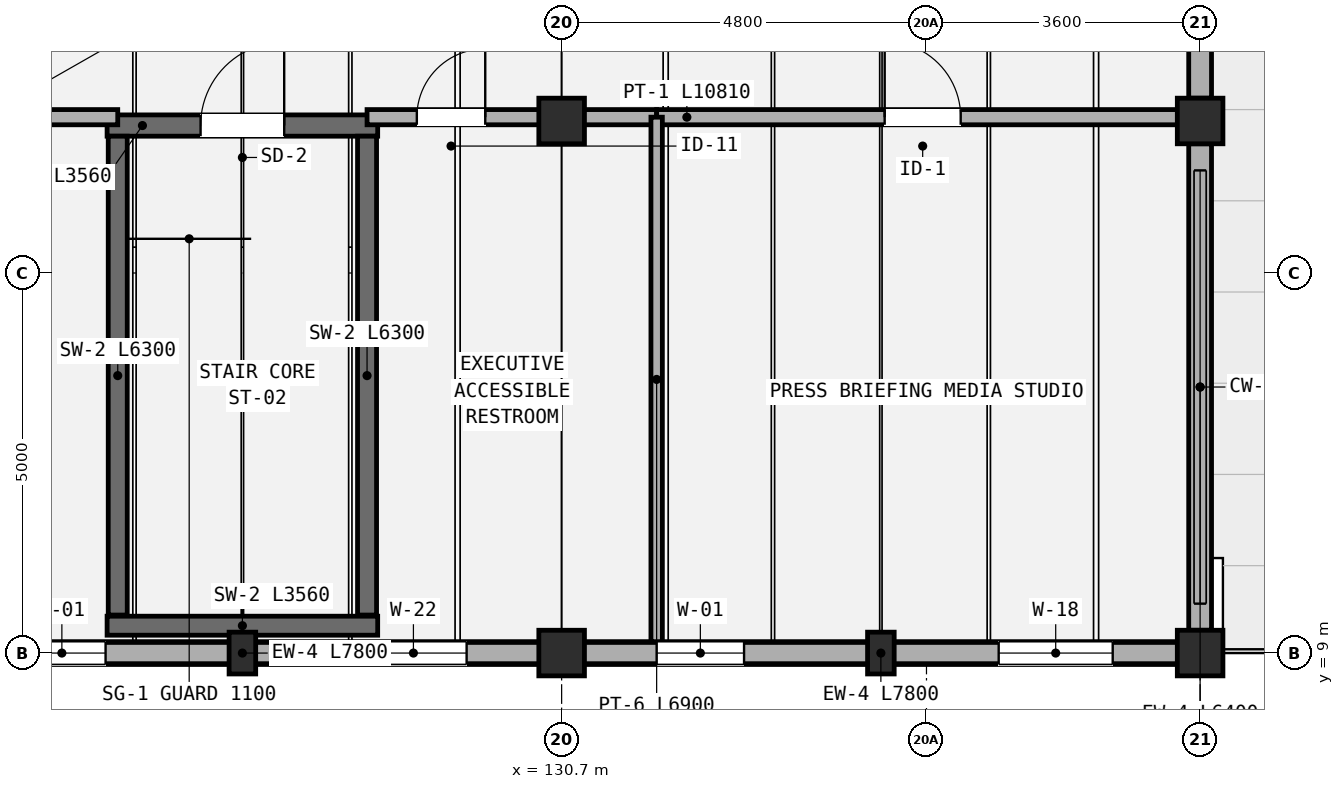
"""IFC4 building model, lengths in metres.
Left out: names, types, materials, properties, quantities, classifications, styles, units other than length and angle.
Written with IfcOpenShell. Run it as: python <this file> out.ifc"""

import sys

from ifc_helpers import new_model, si_unit, direction, frame, frame_2d, origin, origin_2d, place, context, subcontext, project, spatial, polyline, rectangle, outline, extrude, element, fill, save


model = new_model("IFC4")
c1 = context("Model", 3, precision=1e-05, world=origin(), true_north=direction((0.0, 1.0)))
c2 = subcontext(c1, "Body", "Model", "MODEL_VIEW")
j1 = project(units=[si_unit("LENGTHUNIT", "METRE"), si_unit("PLANEANGLEUNIT", "RADIAN")], contexts=[c1])
p1 = place(None, origin())
s1 = spatial("IfcSite", under=j1, at=p1, CompositionType="ELEMENT")
p2 = place(p1, origin())
s2 = spatial("IfcBuilding", under=s1, at=p2, CompositionType="ELEMENT")
p3 = place(p2, frame((0.0, 0.0, 12.75)))
s3 = spatial("IfcBuildingStorey", under=s2, at=p3, CompositionType="ELEMENT", Elevation=12.75)
for number, where, z_axis, x_axis in (
    (1, (130.7, 9.0, 0.0), (0.0, 0.0, 1.0), (1.0, 0.0, 0.0)),
    (2, (130.7, 16.0, 0.0), (0.0, 0.0, 1.0), (1.0, 0.0, 0.0)),
    (3, (139.1, 9.0, 0.0), (0.0, 0.0, 1.0), (1.0, 0.0, 0.0)),
    (4, (139.1, 16.0, 0.0), (0.0, 0.0, 1.0), (1.0, 0.0, 0.0)),
):
    element("IfcColumn", number, at=place(p3, frame(where, z_axis=z_axis, x_axis=x_axis)), inside=s3, PredefinedType="COLUMN", context=c2, shape_type="SweptSolid", body=[
        extrude(rectangle(XDim=0.6, YDim=0.6, at=origin_2d()), origin(), (0.0, 0.0, 1.0), 3.0),
    ])
for number, where, z_axis, x_axis in (
    (5, (126.5, 9.0, 0.0), (0.0, 0.0, 1.0), (1.0, 0.0, 0.0)),
    (6, (134.9, 9.0, 0.0), (0.0, 0.0, 1.0), (1.0, 0.0, 0.0)),
):
    element("IfcColumn", number, at=place(p3, frame(where, z_axis=z_axis, x_axis=x_axis)), inside=s3, PredefinedType="PILASTER", context=c2, shape_type="SweptSolid", body=[
        extrude(rectangle(XDim=0.35, YDim=0.55, at=origin_2d()), origin(), (0.0, 0.0, 1.0), 3.0),
    ])
p4 = place(p3, frame((122.6, 9.0, 0.0), z_axis=(0.0, 0.0, 1.0), x_axis=(1.0, 0.0, 0.0)))
e7 = element("IfcWall", 7, at=p4, inside=s3, PredefinedType="STANDARD", context=c2, shape_type="SweptSolid", body=[
    extrude(rectangle(XDim=7.8, YDim=0.3, at=frame_2d((3.9, 0.0))), origin(), (0.0, 0.0, 1.0), 2.29),
])
p5 = place(p4, frame((0.95, 0.0, 0.6)))
e8 = element("IfcOpeningElement", 8, at=p5, cuts=e7, PredefinedType="OPENING", context=c2, shape_type="SweptSolid", body=[
    extrude(rectangle(XDim=1.15, YDim=1.45, at=frame_2d((0.575, 0.725))), frame((0.0, 0.16, 0.0), z_axis=(0.0, -1.0, 0.0), x_axis=(1.0, 0.0, 0.0)), (0.0, 0.0, 1.0), 0.32),
])
p6 = place(p4, frame((5.45, 0.0, 0.6)))
e9 = element("IfcOpeningElement", 9, at=p6, cuts=e7, PredefinedType="OPENING", context=c2, shape_type="SweptSolid", body=[
    extrude(rectangle(XDim=1.4, YDim=1.45, at=frame_2d((0.7, 0.725))), frame((0.0, 0.16, 0.0), z_axis=(0.0, -1.0, 0.0), x_axis=(1.0, 0.0, 0.0)), (0.0, 0.0, 1.0), 0.32),
])
p7 = place(p3, frame((131.0, 9.0, 0.0), z_axis=(0.0, 0.0, 1.0), x_axis=(1.0, 0.0, 0.0)))
e10 = element("IfcWall", 10, at=p7, inside=s3, PredefinedType="STANDARD", context=c2, shape_type="SweptSolid", body=[
    extrude(rectangle(XDim=7.8, YDim=0.3, at=frame_2d((3.9, 0.0))), origin(), (0.0, 0.0, 1.0), 2.29),
])
p8 = place(p7, frame((0.95, 0.0, 0.6)))
e11 = element("IfcOpeningElement", 11, at=p8, cuts=e10, PredefinedType="OPENING", context=c2, shape_type="SweptSolid", body=[
    extrude(rectangle(XDim=1.15, YDim=1.45, at=frame_2d((0.575, 0.725))), frame((0.0, 0.16, 0.0), z_axis=(0.0, -1.0, 0.0), x_axis=(1.0, 0.0, 0.0)), (0.0, 0.0, 1.0), 0.32),
])
p9 = place(p7, frame((5.45, 0.0, 0.65)))
e12 = element("IfcOpeningElement", 12, at=p9, cuts=e10, PredefinedType="OPENING", context=c2, shape_type="SweptSolid", body=[
    extrude(rectangle(XDim=1.5, YDim=1.4, at=frame_2d((0.75, 0.7))), frame((0.0, 0.16, 0.0), z_axis=(0.0, -1.0, 0.0), x_axis=(1.0, 0.0, 0.0)), (0.0, 0.0, 1.0), 0.32),
])
p10 = place(p3, frame((122.3, 9.0, 3.0), z_axis=(0.0, 0.0, 1.0), x_axis=(1.0, 0.0, 0.0)))
e13 = element("IfcWall", 13, at=p10, inside=s3, PredefinedType="PARAPET", context=c2, shape_type="SweptSolid", body=[
    extrude(outline(polyline([(0.0, 0.0), (8.4, 0.0), (8.4, 0.8), (7.468, 0.8), (7.467, 0.913), (6.534, 0.913), (6.533, 1.025), (5.601, 1.025), (5.6, 1.137), (4.668, 1.137), (4.667, 1.25), (3.734, 1.25), (3.733, 1.137), (2.801, 1.137), (2.8, 1.025), (1.868, 1.025), (1.867, 0.913), (0.934, 0.913), (0.933, 0.8), (0.0, 0.8), (0.0, 0.0)])), frame((0.0, 0.14, 0.0), z_axis=(0.0, -1.0, 0.0), x_axis=(1.0, 0.0, 0.0)), (0.0, 0.0, 1.0), 0.28),
])
p11 = place(p3, frame((130.7, 9.0, 3.0), z_axis=(0.0, 0.0, 1.0), x_axis=(1.0, 0.0, 0.0)))
e14 = element("IfcWall", 14, at=p11, inside=s3, PredefinedType="PARAPET", context=c2, shape_type="SweptSolid", body=[
    extrude(outline(polyline([(0.0, 0.0), (8.4, 0.0), (8.4, 0.8), (7.468, 0.8), (7.467, 0.913), (6.534, 0.913), (6.533, 1.025), (5.601, 1.025), (5.6, 1.137), (4.668, 1.137), (4.667, 1.25), (3.734, 1.25), (3.733, 1.137), (2.801, 1.137), (2.8, 1.025), (1.868, 1.025), (1.867, 0.913), (0.934, 0.913), (0.933, 0.8), (0.0, 0.8), (0.0, 0.0)])), frame((0.0, 0.14, 0.0), z_axis=(0.0, -1.0, 0.0), x_axis=(1.0, 0.0, 0.0)), (0.0, 0.0, 1.0), 0.28),
])
p12 = place(p3, frame((139.1, 9.3, 0.0), z_axis=(0.0, 0.0, 1.0), x_axis=(0.0, 1.0, 0.0)))
e15 = element("IfcWall", 15, at=p12, inside=s3, PredefinedType="STANDARD", context=c2, shape_type="SweptSolid", body=[
    extrude(rectangle(XDim=6.4, YDim=0.3, at=frame_2d((3.2, 0.0))), origin(), (0.0, 0.0, 1.0), 2.35),
])
p13 = place(p3, frame((139.1, 16.3, 0.0), z_axis=(0.0, 0.0, 1.0), x_axis=(0.0, 1.0, 0.0)))
e16 = element("IfcWall", 16, at=p13, inside=s3, PredefinedType="STANDARD", context=c2, shape_type="SweptSolid", body=[
    extrude(rectangle(XDim=7.9, YDim=0.3, at=frame_2d((3.95, 0.0))), origin(), (0.0, 0.0, 1.0), 2.35),
])
p14 = place(p13, frame((0.8, 0.0, 0.0)))
e17 = element("IfcOpeningElement", 17, at=p14, cuts=e16, PredefinedType="OPENING", context=c2, shape_type="SweptSolid", body=[
    extrude(rectangle(XDim=1.08, YDim=2.1, at=frame_2d((0.54, 1.05))), frame((0.0, 0.16, 0.0), z_axis=(0.0, -1.0, 0.0), x_axis=(1.0, 0.0, 0.0)), (0.0, 0.0, 1.0), 0.32),
])
p15 = place(p13, frame((3.95, 0.0, 0.56)))
e18 = element("IfcOpeningElement", 18, at=p15, cuts=e16, PredefinedType="OPENING", context=c2, shape_type="SweptSolid", body=[
    extrude(rectangle(XDim=1.75, YDim=1.55, at=frame_2d((0.875, 0.775))), frame((0.0, 0.16, 0.0), z_axis=(0.0, -1.0, 0.0), x_axis=(1.0, 0.0, 0.0)), (0.0, 0.0, 1.0), 0.32),
])
p16 = place(p3, frame((124.72, 15.94, 0.0), z_axis=(0.0, 0.0, 1.0), x_axis=(1.0, 0.0, 0.0)))
e19 = element("IfcWall", 19, at=p16, inside=s3, PredefinedType="SHEAR", context=c2, shape_type="SweptSolid", body=[
    extrude(rectangle(XDim=3.56, YDim=0.28, at=frame_2d((1.78, 0.0))), origin(), (0.0, 0.0, 1.0), 2.9),
])
p17 = place(p16, frame((1.23, 0.0, 0.0)))
e20 = element("IfcOpeningElement", 20, at=p17, cuts=e19, PredefinedType="OPENING", context=c2, shape_type="SweptSolid", body=[
    extrude(rectangle(XDim=1.1, YDim=2.15, at=frame_2d((0.55, 1.075))), frame((0.0, 0.15, 0.0), z_axis=(0.0, -1.0, 0.0), x_axis=(1.0, 0.0, 0.0)), (0.0, 0.0, 1.0), 0.3),
])
p18 = place(p3, frame((128.28, 9.36, 0.0), z_axis=(0.0, 0.0, 1.0), x_axis=(-1.0, 0.0, 0.0)))
e21 = element("IfcWall", 21, at=p18, inside=s3, PredefinedType="SHEAR", context=c2, shape_type="SweptSolid", body=[
    extrude(rectangle(XDim=3.56, YDim=0.25, at=frame_2d((1.78, 0.0))), origin(), (0.0, 0.0, 1.0), 2.9),
])
for number, where, z_axis, x_axis in (
    (22, (124.86, 15.8, 0.0), (0.0, 0.0, 1.0), (0.0, -1.0, 0.0)),
    (23, (128.14, 9.5, 0.0), (0.0, 0.0, 1.0), (0.0, 1.0, 0.0)),
):
    element("IfcWall", number, at=place(p3, frame(where, z_axis=z_axis, x_axis=x_axis)), inside=s3, PredefinedType="SHEAR", context=c2, shape_type="SweptSolid", body=[
        extrude(rectangle(XDim=6.3, YDim=0.25, at=frame_2d((3.15, 0.0))), origin(), (0.0, 0.0, 1.0), 2.9),
    ])
p19 = place(p3, frame((121.13, 16.05, 0.0), z_axis=(0.0, 0.0, 1.0), x_axis=(1.0, 0.0, 0.0)))
e24 = element("IfcWall", 24, at=p19, inside=s3, PredefinedType="PARTITIONING", context=c2, shape_type="SweptSolid", body=[
    extrude(rectangle(XDim=3.73, YDim=0.2, at=frame_2d((1.865, 0.0))), origin(), (0.0, 0.0, 1.0), 2.3),
])
p20 = place(p3, frame((128.14, 16.05, 0.0), z_axis=(0.0, 0.0, 1.0), x_axis=(1.0, 0.0, 0.0)))
e25 = element("IfcWall", 25, at=p20, inside=s3, PredefinedType="PARTITIONING", context=c2, shape_type="SweptSolid", body=[
    extrude(rectangle(XDim=3.81, YDim=0.2, at=frame_2d((1.905, 0.0))), origin(), (0.0, 0.0, 1.0), 2.3),
])
p21 = place(p20, frame((0.655, 0.0, 0.0)))
e26 = element("IfcOpeningElement", 26, at=p21, cuts=e25, PredefinedType="OPENING", context=c2, shape_type="SweptSolid", body=[
    extrude(rectangle(XDim=0.9, YDim=2.08, at=frame_2d((0.45, 1.04))), frame((0.0, 0.11, 0.0), z_axis=(0.0, -1.0, 0.0), x_axis=(1.0, 0.0, 0.0)), (0.0, 0.0, 1.0), 0.22),
])
p22 = place(p3, frame((131.95, 16.05, 0.0), z_axis=(0.0, 0.0, 1.0), x_axis=(1.0, 0.0, 0.0)))
e27 = element("IfcWall", 27, at=p22, inside=s3, PredefinedType="PARTITIONING", context=c2, shape_type="SweptSolid", body=[
    extrude(rectangle(XDim=7.0, YDim=0.2, at=frame_2d((3.5, 0.0))), origin(), (0.0, 0.0, 1.0), 2.3),
])
p23 = place(p22, frame((3.0, 0.0, 0.0)))
e28 = element("IfcOpeningElement", 28, at=p23, cuts=e27, PredefinedType="OPENING", context=c2, shape_type="SweptSolid", body=[
    extrude(rectangle(XDim=1.0, YDim=2.12, at=frame_2d((0.5, 1.06))), frame((0.0, 0.11, 0.0), z_axis=(0.0, -1.0, 0.0), x_axis=(1.0, 0.0, 0.0)), (0.0, 0.0, 1.0), 0.22),
])
p24 = place(p3, frame((131.95, 9.15, 0.0), z_axis=(0.0, 0.0, 1.0), x_axis=(0.0, 1.0, 0.0)))
e29 = element("IfcWall", 29, at=p24, inside=s3, PredefinedType="PARTITIONING", context=c2, shape_type="SweptSolid", body=[
    extrude(rectangle(XDim=6.9, YDim=0.15, at=frame_2d((3.45, 0.0))), origin(), (0.0, 0.0, 1.0), 2.3),
])
p25 = place(p5, origin())
e30 = element("IfcWindow", 30, at=p25, inside=s3, PartitioningType="SINGLE_PANEL", PredefinedType="WINDOW", context=c2, shape_type="SweptSolid", body=[
    extrude(rectangle(XDim=1.15, YDim=1.45, at=frame_2d((0.575, 0.725))), frame((0.0, 0.03, 0.0), z_axis=(0.0, -1.0, 0.0), x_axis=(1.0, 0.0, 0.0)), (0.0, 0.0, 1.0), 0.06),
])
fill(e8, e30)
p26 = place(p6, origin())
e31 = element("IfcWindow", 31, at=p26, inside=s3, PartitioningType="DOUBLE_PANEL_VERTICAL", PredefinedType="WINDOW", context=c2, shape_type="SweptSolid", body=[
    extrude(rectangle(XDim=1.4, YDim=1.45, at=frame_2d((0.7, 0.725))), frame((0.0, 0.03, 0.0), z_axis=(0.0, -1.0, 0.0), x_axis=(1.0, 0.0, 0.0)), (0.0, 0.0, 1.0), 0.06),
])
fill(e9, e31)
p27 = place(p8, origin())
e32 = element("IfcWindow", 32, at=p27, inside=s3, PartitioningType="SINGLE_PANEL", PredefinedType="WINDOW", context=c2, shape_type="SweptSolid", body=[
    extrude(rectangle(XDim=1.15, YDim=1.45, at=frame_2d((0.575, 0.725))), frame((0.0, 0.03, 0.0), z_axis=(0.0, -1.0, 0.0), x_axis=(1.0, 0.0, 0.0)), (0.0, 0.0, 1.0), 0.06),
])
fill(e11, e32)
p28 = place(p9, origin())
e33 = element("IfcWindow", 33, at=p28, inside=s3, PartitioningType="DOUBLE_PANEL_VERTICAL", PredefinedType="WINDOW", context=c2, shape_type="SweptSolid", body=[
    extrude(rectangle(XDim=1.5, YDim=1.4, at=frame_2d((0.75, 0.7))), frame((0.0, 0.03, 0.0), z_axis=(0.0, -1.0, 0.0), x_axis=(1.0, 0.0, 0.0)), (0.0, 0.0, 1.0), 0.06),
])
fill(e12, e33)
p29 = place(p17, origin())
e34 = element("IfcDoor", 34, at=p29, inside=s3, OperationType="SINGLE_SWING_RIGHT", PredefinedType="DOOR", context=c2, shape_type="SweptSolid", body=[
    extrude(rectangle(XDim=1.1, YDim=2.15, at=frame_2d((0.55, 1.075))), frame((0.0, 0.025, 0.0), z_axis=(0.0, -1.0, 0.0), x_axis=(1.0, 0.0, 0.0)), (0.0, 0.0, 1.0), 0.05),
])
fill(e20, e34)
p30 = place(p21, origin())
e35 = element("IfcDoor", 35, at=p30, inside=s3, OperationType="SINGLE_SWING_RIGHT", PredefinedType="DOOR", context=c2, shape_type="SweptSolid", body=[
    extrude(rectangle(XDim=0.9, YDim=2.08, at=frame_2d((0.45, 1.04))), frame((0.0, 0.025, 0.0), z_axis=(0.0, -1.0, 0.0), x_axis=(1.0, 0.0, 0.0)), (0.0, 0.0, 1.0), 0.05),
])
fill(e26, e35)
p31 = place(p23, origin())
e36 = element("IfcDoor", 36, at=p31, inside=s3, OperationType="SINGLE_SWING_LEFT", PredefinedType="DOOR", context=c2, shape_type="SweptSolid", body=[
    extrude(rectangle(XDim=1.0, YDim=2.12, at=frame_2d((0.5, 1.06))), frame((0.0, 0.025, 0.0), z_axis=(0.0, -1.0, 0.0), x_axis=(1.0, 0.0, 0.0)), (0.0, 0.0, 1.0), 0.05),
])
fill(e28, e36)
save(model, sys.argv[1])
